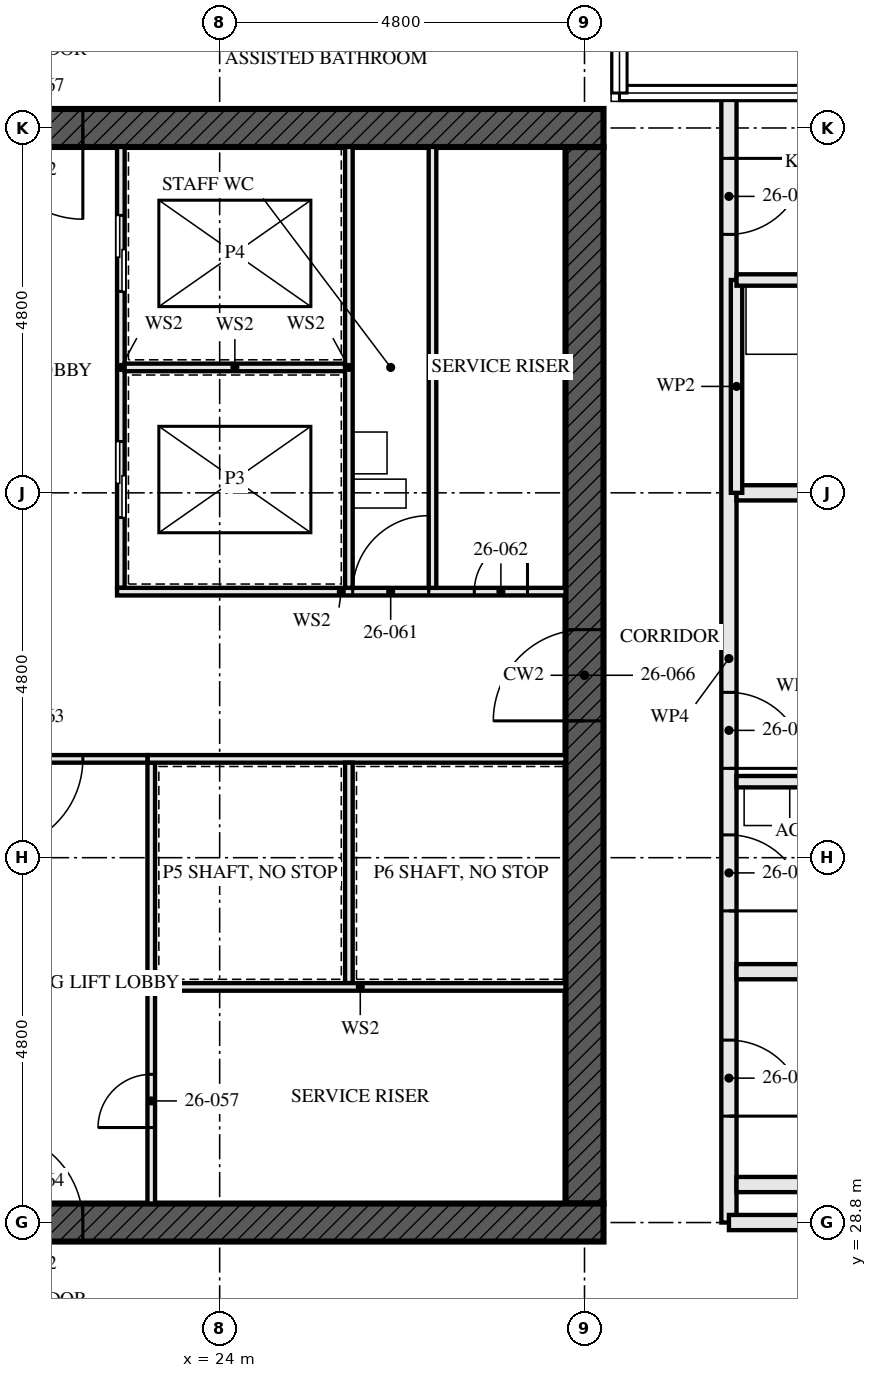
"""IFC4 building model, lengths in metres.
Left out: names, types, materials, properties, quantities, classifications, styles, units other than length and angle.
Written with IfcOpenShell. Run it as: python <this file> out.ifc"""

import sys

from ifc_helpers import new_model, si_unit, direction, frame, frame_2d, origin, place, context, subcontext, project, spatial, rectangle, extrude, element, fill, save


model = new_model("IFC4")
c1 = context("Model", 3, precision=1e-05, world=origin(), true_north=direction((0.0, 1.0)))
c2 = subcontext(c1, "Body", "Model", "MODEL_VIEW")
j1 = project(units=[si_unit("LENGTHUNIT", "METRE"), si_unit("PLANEANGLEUNIT", "RADIAN")], contexts=[c1])
p1 = place(None, origin())
s1 = spatial("IfcSite", under=j1, at=p1, CompositionType="ELEMENT")
p2 = place(p1, origin())
s2 = spatial("IfcBuilding", under=s1, at=p2, CompositionType="ELEMENT")
p3 = place(p2, frame((0.0, 0.0, 98.0)))
s3 = spatial("IfcBuildingStorey", under=s2, at=p3, CompositionType="ELEMENT", Elevation=98.0)
p4 = place(p3, frame((14.15, 28.8, -0.17), z_axis=(0.0, 0.0, 1.0), x_axis=(1.0, 0.0, 0.0)))
e1 = element("IfcWall", 1, at=p4, inside=s3, PredefinedType="SHEAR", context=c2, shape_type="SweptSolid", body=[
    extrude(rectangle(XDim=14.9, YDim=0.5, at=frame_2d((7.45, 0.0))), origin(), (0.0, 0.0, 1.0), 3.5),
])
p5 = place(p4, frame((6.85, 0.0, 0.17)))
e2 = element("IfcOpeningElement", 2, at=p5, cuts=e1, PredefinedType="OPENING", context=c2, shape_type="SweptSolid", body=[
    extrude(rectangle(XDim=1.2, YDim=2.1, at=frame_2d((0.6, 1.05))), frame((0.0, 0.26, 0.0), z_axis=(0.0, -1.0, 0.0), x_axis=(1.0, 0.0, 0.0)), (0.0, 0.0, 1.0), 0.521),
])
p6 = place(p3, frame((29.05, 43.2, -0.17), z_axis=(0.0, 0.0, 1.0), x_axis=(-1.0, 0.0, 0.0)))
e3 = element("IfcWall", 3, at=p6, inside=s3, PredefinedType="SHEAR", context=c2, shape_type="SweptSolid", body=[
    extrude(rectangle(XDim=14.9, YDim=0.5, at=frame_2d((7.45, 0.0))), origin(), (0.0, 0.0, 1.0), 3.5),
])
p7 = place(p6, frame((6.85, 0.0, 0.17)))
e4 = element("IfcOpeningElement", 4, at=p7, cuts=e3, PredefinedType="OPENING", context=c2, shape_type="SweptSolid", body=[
    extrude(rectangle(XDim=1.2, YDim=2.1, at=frame_2d((0.6, 1.05))), frame((0.0, 0.26, 0.0), z_axis=(0.0, -1.0, 0.0), x_axis=(1.0, 0.0, 0.0)), (0.0, 0.0, 1.0), 0.521),
])
p8 = place(p3, frame((28.8, 29.05, -0.17), z_axis=(0.0, 0.0, 1.0), x_axis=(0.0, 1.0, 0.0)))
e5 = element("IfcWall", 5, at=p8, inside=s3, PredefinedType="SHEAR", context=c2, shape_type="SweptSolid", body=[
    extrude(rectangle(XDim=13.9, YDim=0.5, at=frame_2d((6.95, 0.0))), origin(), (0.0, 0.0, 1.0), 3.5),
])
p9 = place(p8, frame((6.35, 0.0, 0.17)))
e6 = element("IfcOpeningElement", 6, at=p9, cuts=e5, PredefinedType="OPENING", context=c2, shape_type="SweptSolid", body=[
    extrude(rectangle(XDim=1.2, YDim=2.1, at=frame_2d((0.6, 1.05))), frame((0.0, 0.26, 0.0), z_axis=(0.0, -1.0, 0.0), x_axis=(1.0, 0.0, 0.0)), (0.0, 0.0, 1.0), 0.521),
])
for number, where, z_axis, x_axis in (
    (7, (35.5, 29.3, 0.0), (0.0, 0.0, 1.0), (-1.0, 0.0, 0.0)),
    (8, (35.5, 32.1, 0.0), (0.0, 0.0, 1.0), (-1.0, 0.0, 0.0)),
):
    element("IfcWall", number, at=place(p3, frame(where, z_axis=z_axis, x_axis=x_axis)), inside=s3, PredefinedType="SOLIDWALL", context=c2, shape_type="SweptSolid", body=[
        extrude(rectangle(XDim=4.7, YDim=0.2, at=frame_2d((2.35, 0.0))), origin(), (0.0, 0.0, 1.0), 2.99),
    ])
p10 = place(p3, frame((33.8, 34.6, 0.0), z_axis=(0.0, 0.0, 1.0), x_axis=(-1.0, 0.0, 0.0)))
e9 = element("IfcWall", 9, at=p10, inside=s3, PredefinedType="PARTITIONING", context=c2, shape_type="SweptSolid", body=[
    extrude(rectangle(XDim=3.0, YDim=0.15, at=frame_2d((1.5, 0.0))), origin(), (0.0, 0.0, 1.0), 3.33),
])
p11 = place(p3, frame((38.055, 38.4, 0.0), z_axis=(0.0, 0.0, 1.0), x_axis=(-1.0, 0.0, 0.0)))
e10 = element("IfcWall", 10, at=p11, inside=s3, PredefinedType="PARTITIONING", context=c2, shape_type="SweptSolid", body=[
    extrude(rectangle(XDim=7.255, YDim=0.2, at=frame_2d((3.627, 0.0))), origin(), (0.0, 0.0, 1.0), 2.55),
])
p12 = place(p3, frame((33.8, 41.2, 0.0), z_axis=(0.0, 0.0, 1.0), x_axis=(-1.0, 0.0, 0.0)))
e11 = element("IfcWall", 11, at=p12, inside=s3, PredefinedType="PARTITIONING", context=c2, shape_type="SweptSolid", body=[
    extrude(rectangle(XDim=3.0, YDim=0.15, at=frame_2d((1.5, 0.0))), origin(), (0.0, 0.0, 1.0), 3.33),
])
p13 = place(p3, frame((30.8, 38.4, 0.0), z_axis=(0.0, 0.0, 1.0), x_axis=(0.0, 1.0, 0.0)))
e12 = element("IfcWall", 12, at=p13, inside=s3, PredefinedType="PARTITIONING", context=c2, shape_type="SweptSolid", body=[
    extrude(rectangle(XDim=2.8, YDim=0.15, at=frame_2d((1.4, 0.0))), origin(), (0.0, 0.0, 1.0), 3.33),
])
p14 = place(p3, frame((30.7, 28.8, 0.0), z_axis=(0.0, 0.0, 1.0), x_axis=(0.0, 1.0, 0.0)))
e13 = element("IfcWall", 13, at=p14, inside=s3, PredefinedType="PARTITIONING", context=c2, shape_type="SweptSolid", body=[
    extrude(rectangle(XDim=14.84, YDim=0.2, at=frame_2d((7.42, 0.0))), origin(), (0.0, 0.0, 1.0), 2.32),
])
p15 = place(p14, frame((1.4, 0.0, 0.0)))
e14 = element("IfcOpeningElement", 14, at=p15, cuts=e13, PredefinedType="OPENING", context=c2, shape_type="SweptSolid", body=[
    extrude(rectangle(XDim=1.0, YDim=2.1, at=frame_2d((0.5, 1.05))), frame((0.0, 0.111, 0.0), z_axis=(0.0, -1.0, 0.0), x_axis=(1.0, 0.0, 0.0)), (0.0, 0.0, 1.0), 0.221),
])
p16 = place(p14, frame((4.1, 0.0, 0.0)))
e15 = element("IfcOpeningElement", 15, at=p16, cuts=e13, PredefinedType="OPENING", context=c2, shape_type="SweptSolid", body=[
    extrude(rectangle(XDim=1.0, YDim=2.1, at=frame_2d((0.5, 1.05))), frame((0.0, 0.111, 0.0), z_axis=(0.0, -1.0, 0.0), x_axis=(1.0, 0.0, 0.0)), (0.0, 0.0, 1.0), 0.221),
])
p17 = place(p14, frame((5.975, 0.0, 0.0)))
e16 = element("IfcOpeningElement", 16, at=p17, cuts=e13, PredefinedType="OPENING", context=c2, shape_type="SweptSolid", body=[
    extrude(rectangle(XDim=1.0, YDim=2.1, at=frame_2d((0.5, 1.05))), frame((0.0, 0.111, 0.0), z_axis=(0.0, -1.0, 0.0), x_axis=(1.0, 0.0, 0.0)), (0.0, 0.0, 1.0), 0.221),
])
p18 = place(p14, frame((13.0, 0.0, 0.0)))
e17 = element("IfcOpeningElement", 17, at=p18, cuts=e13, PredefinedType="OPENING", context=c2, shape_type="SweptSolid", body=[
    extrude(rectangle(XDim=1.0, YDim=2.1, at=frame_2d((0.5, 1.05))), frame((0.0, 0.111, 0.0), z_axis=(0.0, -1.0, 0.0), x_axis=(1.0, 0.0, 0.0)), (0.0, 0.0, 1.0), 0.221),
])
p19 = place(p3, frame((26.8, 37.15, 0.0), z_axis=(0.0, 0.0, 1.0), x_axis=(0.0, 1.0, 0.0)))
e18 = element("IfcWall", 18, at=p19, inside=s3, PredefinedType="SOLIDWALL", context=c2, shape_type="SweptSolid", body=[
    extrude(rectangle(XDim=5.8, YDim=0.1, at=frame_2d((2.9, 0.0))), origin(), (0.0, 0.0, 1.0), 3.33),
])
p20 = place(p3, frame((22.7, 37.15, 0.0), z_axis=(0.0, 0.0, 1.0), x_axis=(0.0, 1.0, 0.0)))
e19 = element("IfcWall", 19, at=p20, inside=s3, PredefinedType="SOLIDWALL", context=c2, shape_type="SweptSolid", body=[
    extrude(rectangle(XDim=5.8, YDim=0.1, at=frame_2d((2.9, 0.0))), origin(), (0.0, 0.0, 1.0), 3.33),
])
p21 = place(p20, frame((0.925, 0.0, 0.0)))
e20 = element("IfcOpeningElement", 20, at=p21, cuts=e19, PredefinedType="OPENING", context=c2, shape_type="SweptSolid", body=[
    extrude(rectangle(XDim=1.0, YDim=2.1, at=frame_2d((0.5, 1.05))), frame((0.0, 0.061, 0.0), z_axis=(0.0, -1.0, 0.0), x_axis=(1.0, 0.0, 0.0)), (0.0, 0.0, 1.0), 0.121),
])
p22 = place(p20, frame((3.9, 0.0, 0.0)))
e21 = element("IfcOpeningElement", 21, at=p22, cuts=e19, PredefinedType="OPENING", context=c2, shape_type="SweptSolid", body=[
    extrude(rectangle(XDim=1.0, YDim=2.1, at=frame_2d((0.5, 1.05))), frame((0.0, 0.061, 0.0), z_axis=(0.0, -1.0, 0.0), x_axis=(1.0, 0.0, 0.0)), (0.0, 0.0, 1.0), 0.121),
])
p23 = place(p3, frame((23.1, 29.05, 0.0), z_axis=(0.0, 0.0, 1.0), x_axis=(0.0, 1.0, 0.0)))
e22 = element("IfcWall", 22, at=p23, inside=s3, PredefinedType="SOLIDWALL", context=c2, shape_type="SweptSolid", body=[
    extrude(rectangle(XDim=5.8, YDim=0.1, at=frame_2d((2.9, 0.0))), origin(), (0.0, 0.0, 1.0), 3.33),
])
p24 = place(p23, frame((1.0, 0.0, 0.0)))
e23 = element("IfcOpeningElement", 23, at=p24, cuts=e22, PredefinedType="OPENING", context=c2, shape_type="SweptSolid", body=[
    extrude(rectangle(XDim=0.7, YDim=2.1, at=frame_2d((0.35, 1.05))), frame((0.0, 0.061, 0.0), z_axis=(0.0, -1.0, 0.0), x_axis=(1.0, 0.0, 0.0)), (0.0, 0.0, 1.0), 0.121),
])
p25 = place(p3, frame((23.05, 34.9, 0.0), z_axis=(0.0, 0.0, 1.0), x_axis=(1.0, 0.0, 0.0)))
e24 = element("IfcWall", 24, at=p25, inside=s3, PredefinedType="SOLIDWALL", context=c2, shape_type="SweptSolid", body=[
    extrude(rectangle(XDim=5.5, YDim=0.1, at=frame_2d((2.75, 0.0))), origin(), (0.0, 0.0, 1.0), 3.33),
])
p26 = place(p3, frame((22.65, 37.1, 0.0), z_axis=(0.0, 0.0, 1.0), x_axis=(1.0, 0.0, 0.0)))
e25 = element("IfcWall", 25, at=p26, inside=s3, PredefinedType="SOLIDWALL", context=c2, shape_type="SweptSolid", body=[
    extrude(rectangle(XDim=5.9, YDim=0.1, at=frame_2d((2.95, 0.0))), origin(), (0.0, 0.0, 1.0), 3.33),
])
p27 = place(p26, frame((3.1, 0.0, 0.0)))
e26 = element("IfcOpeningElement", 26, at=p27, cuts=e25, PredefinedType="OPENING", context=c2, shape_type="SweptSolid", body=[
    extrude(rectangle(XDim=1.0, YDim=2.1, at=frame_2d((0.5, 1.05))), frame((0.0, 0.061, 0.0), z_axis=(0.0, -1.0, 0.0), x_axis=(1.0, 0.0, 0.0)), (0.0, 0.0, 1.0), 0.121),
])
p28 = place(p26, frame((4.7, 0.0, 0.0)))
e27 = element("IfcOpeningElement", 27, at=p28, cuts=e25, PredefinedType="OPENING", context=c2, shape_type="SweptSolid", body=[
    extrude(rectangle(XDim=0.7, YDim=2.1, at=frame_2d((0.35, 1.05))), frame((0.0, 0.061, 0.0), z_axis=(0.0, -1.0, 0.0), x_axis=(1.0, 0.0, 0.0)), (0.0, 0.0, 1.0), 0.121),
])
p29 = place(p3, frame((20.55, 34.9, 0.0), z_axis=(0.0, 0.0, 1.0), x_axis=(1.0, 0.0, 0.0)))
e28 = element("IfcWall", 28, at=p29, inside=s3, PredefinedType="SOLIDWALL", context=c2, shape_type="SweptSolid", body=[
    extrude(rectangle(XDim=2.5, YDim=0.1, at=frame_2d((1.25, 0.0))), origin(), (0.0, 0.0, 1.0), 3.33),
])
p30 = place(p29, frame((0.45, 0.0, 0.0)))
e29 = element("IfcOpeningElement", 29, at=p30, cuts=e28, PredefinedType="OPENING", context=c2, shape_type="SweptSolid", body=[
    extrude(rectangle(XDim=1.2, YDim=2.1, at=frame_2d((0.6, 1.05))), frame((0.0, 0.061, 0.0), z_axis=(0.0, -1.0, 0.0), x_axis=(1.0, 0.0, 0.0)), (0.0, 0.0, 1.0), 0.121),
])
p31 = place(p3, frame((22.75, 40.05, 0.0), z_axis=(0.0, 0.0, 1.0), x_axis=(1.0, 0.0, 0.0)))
e30 = element("IfcWall", 30, at=p31, inside=s3, PredefinedType="SOLIDWALL", context=c2, shape_type="SweptSolid", body=[
    extrude(rectangle(XDim=2.9, YDim=0.1, at=frame_2d((1.45, 0.0))), origin(), (0.0, 0.0, 1.0), 3.33),
])
p32 = place(p3, frame((25.7, 37.15, 0.0), z_axis=(0.0, 0.0, 1.0), x_axis=(0.0, 1.0, 0.0)))
e31 = element("IfcWall", 31, at=p32, inside=s3, PredefinedType="SOLIDWALL", context=c2, shape_type="SweptSolid", body=[
    extrude(rectangle(XDim=5.8, YDim=0.1, at=frame_2d((2.9, 0.0))), origin(), (0.0, 0.0, 1.0), 3.33),
])
p33 = place(p3, frame((25.7, 31.95, 0.0), z_axis=(0.0, 0.0, 1.0), x_axis=(0.0, 1.0, 0.0)))
e32 = element("IfcWall", 32, at=p33, inside=s3, PredefinedType="SOLIDWALL", context=c2, shape_type="SweptSolid", body=[
    extrude(rectangle(XDim=2.9, YDim=0.1, at=frame_2d((1.45, 0.0))), origin(), (0.0, 0.0, 1.0), 3.33),
])
p34 = place(p3, frame((23.15, 31.9, 0.0), z_axis=(0.0, 0.0, 1.0), x_axis=(1.0, 0.0, 0.0)))
e33 = element("IfcWall", 33, at=p34, inside=s3, PredefinedType="SOLIDWALL", context=c2, shape_type="SweptSolid", body=[
    extrude(rectangle(XDim=5.4, YDim=0.1, at=frame_2d((2.7, 0.0))), origin(), (0.0, 0.0, 1.0), 3.33),
])
p35 = place(p3, frame((33.255, 28.8, 0.0), z_axis=(0.0, 0.0, 1.0), x_axis=(-1.0, 0.0, 0.0)))
e34 = element("IfcWall", 34, at=p35, inside=s3, PredefinedType="PARTITIONING", context=c2, shape_type="SweptSolid", body=[
    extrude(rectangle(XDim=2.555, YDim=0.2, at=frame_2d((1.277, 0.0))), origin(), (0.0, 0.0, 1.0), 2.32),
])
p36 = place(p15, frame((1.0, 0.0, 0.0), z_axis=(0.0, 0.0, 1.0), x_axis=(-1.0, 0.0, 0.0)))
e35 = element("IfcDoor", 35, at=p36, inside=s3, OperationType="SINGLE_SWING_LEFT", PredefinedType="DOOR", context=c2, shape_type="SweptSolid", body=[
    extrude(rectangle(XDim=1.0, YDim=2.1, at=frame_2d((0.5, 1.05))), frame((0.0, 0.032, 0.0), z_axis=(0.0, -1.0, 0.0), x_axis=(1.0, 0.0, 0.0)), (0.0, 0.0, 1.0), 0.064),
])
fill(e14, e35)
p37 = place(p16, frame((1.0, 0.0, 0.0), z_axis=(0.0, 0.0, 1.0), x_axis=(-1.0, 0.0, 0.0)))
e36 = element("IfcDoor", 36, at=p37, inside=s3, OperationType="SINGLE_SWING_LEFT", PredefinedType="DOOR", context=c2, shape_type="SweptSolid", body=[
    extrude(rectangle(XDim=1.0, YDim=2.1, at=frame_2d((0.5, 1.05))), frame((0.0, 0.027, 0.0), z_axis=(0.0, -1.0, 0.0), x_axis=(1.0, 0.0, 0.0)), (0.0, 0.0, 1.0), 0.054),
])
fill(e15, e36)
p38 = place(p17, frame((1.0, 0.0, 0.0), z_axis=(0.0, 0.0, 1.0), x_axis=(-1.0, 0.0, 0.0)))
e37 = element("IfcDoor", 37, at=p38, inside=s3, OperationType="SINGLE_SWING_LEFT", PredefinedType="DOOR", context=c2, shape_type="SweptSolid", body=[
    extrude(rectangle(XDim=1.0, YDim=2.1, at=frame_2d((0.5, 1.05))), frame((0.0, 0.027, 0.0), z_axis=(0.0, -1.0, 0.0), x_axis=(1.0, 0.0, 0.0)), (0.0, 0.0, 1.0), 0.054),
])
fill(e16, e37)
p39 = place(p18, frame((1.0, 0.0, 0.0), z_axis=(0.0, 0.0, 1.0), x_axis=(-1.0, 0.0, 0.0)))
e38 = element("IfcDoor", 38, at=p39, inside=s3, OperationType="SINGLE_SWING_RIGHT", PredefinedType="DOOR", context=c2, shape_type="SweptSolid", body=[
    extrude(rectangle(XDim=1.0, YDim=2.1, at=frame_2d((0.5, 1.05))), frame((0.0, 0.027, 0.0), z_axis=(0.0, -1.0, 0.0), x_axis=(1.0, 0.0, 0.0)), (0.0, 0.0, 1.0), 0.054),
])
fill(e17, e38)
p40 = place(p21, origin())
e39 = element("IfcDoor", 39, at=p40, inside=s3, OperationType="SLIDING_TO_LEFT", PredefinedType="DOOR", context=c2, shape_type="SweptSolid", body=[
    extrude(rectangle(XDim=1.0, YDim=2.1, at=frame_2d((0.5, 1.05))), frame((0.0, 0.05, 0.0), z_axis=(0.0, -1.0, 0.0), x_axis=(1.0, 0.0, 0.0)), (0.0, 0.0, 1.0), 0.1),
])
fill(e20, e39)
p41 = place(p22, origin())
e40 = element("IfcDoor", 40, at=p41, inside=s3, OperationType="SLIDING_TO_LEFT", PredefinedType="DOOR", context=c2, shape_type="SweptSolid", body=[
    extrude(rectangle(XDim=1.0, YDim=2.1, at=frame_2d((0.5, 1.05))), frame((0.0, 0.05, 0.0), z_axis=(0.0, -1.0, 0.0), x_axis=(1.0, 0.0, 0.0)), (0.0, 0.0, 1.0), 0.1),
])
fill(e21, e40)
p42 = place(p24, origin())
e41 = element("IfcDoor", 41, at=p42, inside=s3, OperationType="SINGLE_SWING_RIGHT", PredefinedType="DOOR", context=c2, shape_type="SweptSolid", body=[
    extrude(rectangle(XDim=0.7, YDim=2.1, at=frame_2d((0.35, 1.05))), frame((0.0, 0.027, 0.0), z_axis=(0.0, -1.0, 0.0), x_axis=(1.0, 0.0, 0.0)), (0.0, 0.0, 1.0), 0.054),
])
fill(e23, e41)
p43 = place(p27, origin())
e42 = element("IfcDoor", 42, at=p43, inside=s3, OperationType="SINGLE_SWING_LEFT", PredefinedType="DOOR", context=c2, shape_type="SweptSolid", body=[
    extrude(rectangle(XDim=1.0, YDim=2.1, at=frame_2d((0.5, 1.05))), frame((0.0, 0.027, 0.0), z_axis=(0.0, -1.0, 0.0), x_axis=(1.0, 0.0, 0.0)), (0.0, 0.0, 1.0), 0.054),
])
fill(e26, e42)
p44 = place(p28, origin())
e43 = element("IfcDoor", 43, at=p44, inside=s3, OperationType="SINGLE_SWING_LEFT", PredefinedType="DOOR", context=c2, shape_type="SweptSolid", body=[
    extrude(rectangle(XDim=0.7, YDim=2.1, at=frame_2d((0.35, 1.05))), frame((0.0, 0.027, 0.0), z_axis=(0.0, -1.0, 0.0), x_axis=(1.0, 0.0, 0.0)), (0.0, 0.0, 1.0), 0.054),
])
fill(e27, e43)
p45 = place(p30, frame((1.2, 0.0, 0.0), z_axis=(0.0, 0.0, 1.0), x_axis=(-1.0, 0.0, 0.0)))
e44 = element("IfcDoor", 44, at=p45, inside=s3, OperationType="SINGLE_SWING_LEFT", PredefinedType="DOOR", context=c2, shape_type="SweptSolid", body=[
    extrude(rectangle(XDim=1.2, YDim=2.1, at=frame_2d((0.6, 1.05))), frame((0.0, 0.027, 0.0), z_axis=(0.0, -1.0, 0.0), x_axis=(1.0, 0.0, 0.0)), (0.0, 0.0, 1.0), 0.054),
])
fill(e29, e44)
p46 = place(p5, origin())
e45 = element("IfcDoor", 45, at=p46, inside=s3, OperationType="SINGLE_SWING_LEFT", PredefinedType="DOOR", context=c2, shape_type="SweptSolid", body=[
    extrude(rectangle(XDim=1.2, YDim=2.1, at=frame_2d((0.6, 1.05))), frame((0.0, 0.027, 0.0), z_axis=(0.0, -1.0, 0.0), x_axis=(1.0, 0.0, 0.0)), (0.0, 0.0, 1.0), 0.054),
])
fill(e2, e45)
p47 = place(p9, origin())
e46 = element("IfcDoor", 46, at=p47, inside=s3, OperationType="SINGLE_SWING_LEFT", PredefinedType="DOOR", context=c2, shape_type="SweptSolid", body=[
    extrude(rectangle(XDim=1.2, YDim=2.1, at=frame_2d((0.6, 1.05))), frame((0.0, 0.027, 0.0), z_axis=(0.0, -1.0, 0.0), x_axis=(1.0, 0.0, 0.0)), (0.0, 0.0, 1.0), 0.054),
])
fill(e6, e46)
p48 = place(p7, origin())
e47 = element("IfcDoor", 47, at=p48, inside=s3, OperationType="SINGLE_SWING_LEFT", PredefinedType="DOOR", context=c2, shape_type="SweptSolid", body=[
    extrude(rectangle(XDim=1.2, YDim=2.1, at=frame_2d((0.6, 1.05))), frame((0.0, 0.027, 0.0), z_axis=(0.0, -1.0, 0.0), x_axis=(1.0, 0.0, 0.0)), (0.0, 0.0, 1.0), 0.054),
])
fill(e4, e47)
save(model, sys.argv[1])
